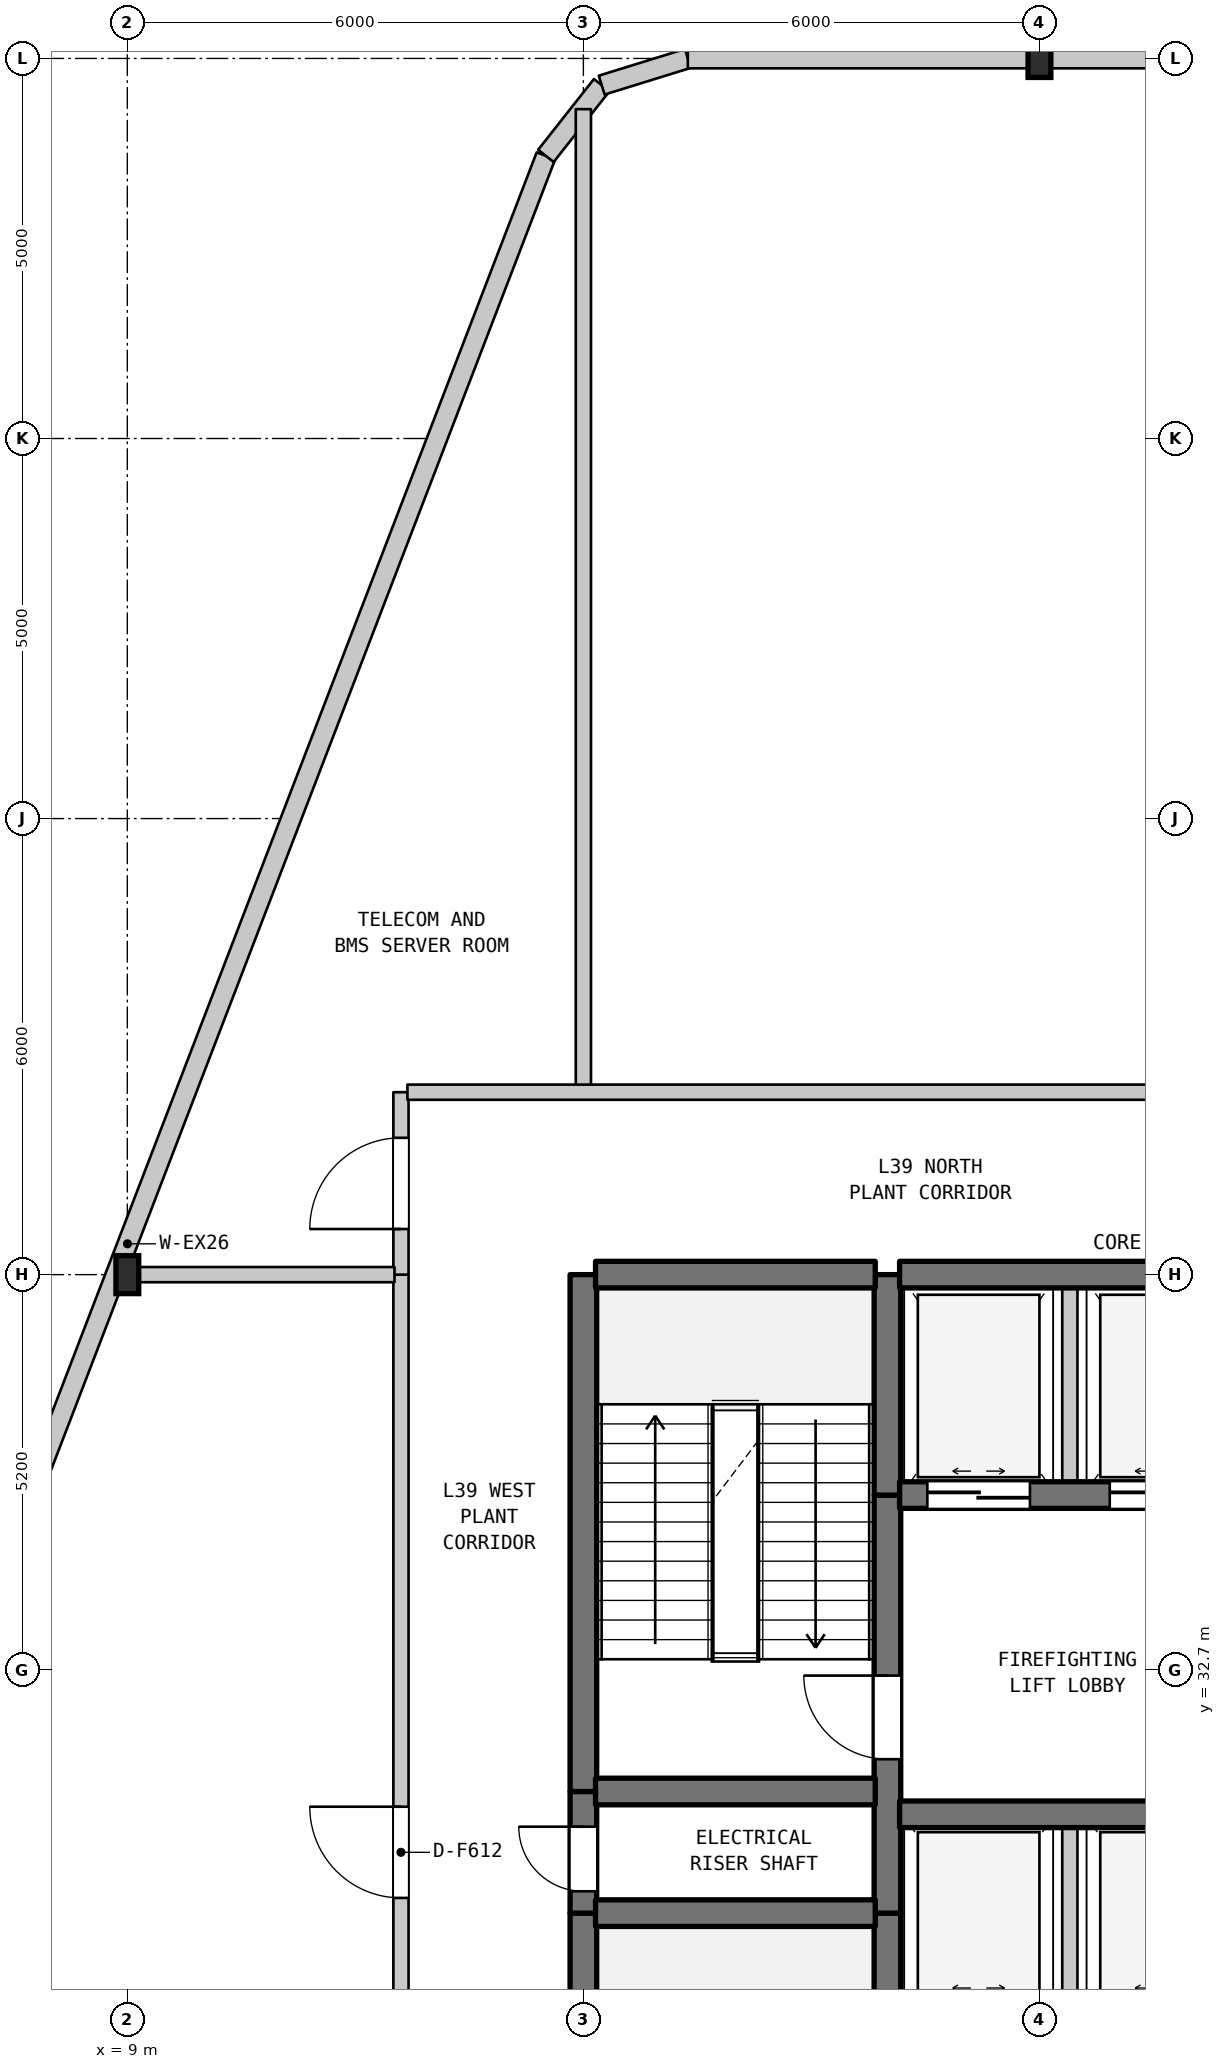
"""IFC4 building model, lengths in metres.
Left out: names, types, materials, properties, quantities, classifications, styles, units other than length and angle.
Written with IfcOpenShell. Run it as: python <this file> out.ifc"""

import sys

from ifc_helpers import new_model, si_unit, direction, frame, frame_2d, origin, origin_2d, place, context, subcontext, project, spatial, rectangle, i_section, extrude, element, fill, save


model = new_model("IFC4")
c1 = context("Model", 3, precision=1e-05, world=origin(), true_north=direction((0.0, 1.0)))
c2 = subcontext(c1, "Body", "Model", "MODEL_VIEW")
j1 = project(units=[si_unit("LENGTHUNIT", "METRE"), si_unit("PLANEANGLEUNIT", "RADIAN")], contexts=[c1])
p1 = place(None, origin())
s1 = spatial("IfcSite", under=j1, at=p1, CompositionType="ELEMENT")
p2 = place(p1, origin())
s2 = spatial("IfcBuilding", under=s1, at=p2, CompositionType="ELEMENT")
p3 = place(p2, frame((0.0, 0.0, 159.4)))
s3 = spatial("IfcBuildingStorey", under=s2, at=p3, CompositionType="ELEMENT", Elevation=159.4)
for number, where, z_axis, x_axis in (
    (1, (9.0, 37.9, 0.0), (0.0, 0.0, 1.0), (1.0, 0.0, 0.0)),
    (2, (21.0, 53.9, 0.0), (0.0, 0.0, 1.0), (1.0, 0.0, 0.0)),
):
    element("IfcColumn", number, at=place(p3, frame(where, z_axis=z_axis, x_axis=x_axis)), inside=s3, PredefinedType="COLUMN", context=c2, shape_type="SweptSolid", body=[
        extrude(i_section(OverallWidth=0.3, OverallDepth=0.5, WebThickness=0.014, FlangeThickness=0.028, FilletRadius=0.027, at=origin_2d()), origin(), (0.0, 0.0, 1.0), 5.2),
    ])
p4 = place(p3, frame((3.497, 23.993, 0.0), z_axis=(0.0, 0.0, 1.0), x_axis=(0.358990281293, 0.93334129767, 0.0)))
e3 = element("IfcWall", 3, at=p4, inside=s3, PredefinedType="STANDARD", context=c2, shape_type="SweptSolid", body=[
    extrude(rectangle(XDim=30.669, YDim=0.26, at=frame_2d((15.335, 0.0))), origin(), (0.0, 0.0, 1.0), 4.89),
])
p5 = place(p3, frame((14.507, 52.618, 0.0), z_axis=(0.0, 0.0, 1.0), x_axis=(0.619003121736, 0.78538852505, 0.0)))
e4 = element("IfcWall", 4, at=p5, inside=s3, PredefinedType="STANDARD", context=c2, shape_type="SweptSolid", body=[
    extrude(rectangle(XDim=1.186, YDim=0.26, at=frame_2d((0.593, 0.0))), origin(), (0.0, 0.0, 1.0), 4.89),
])
p6 = place(p3, frame((15.241, 53.549, 0.0), z_axis=(0.0, 0.0, 1.0), x_axis=(0.955256816454, 0.295777643879, 0.0)))
e5 = element("IfcWall", 5, at=p6, inside=s3, PredefinedType="STANDARD", context=c2, shape_type="SweptSolid", body=[
    extrude(rectangle(XDim=1.186, YDim=0.26, at=frame_2d((0.593, 0.0))), origin(), (0.0, 0.0, 1.0), 4.89),
])
p7 = place(p3, frame((16.374, 53.9, 0.0), z_axis=(0.0, 0.0, 1.0), x_axis=(1.0, 0.0, 0.0)))
e6 = element("IfcWall", 6, at=p7, inside=s3, PredefinedType="STANDARD", context=c2, shape_type="SweptSolid", body=[
    extrude(rectangle(XDim=4.626, YDim=0.26, at=frame_2d((2.313, 0.0))), origin(), (0.0, 0.0, 1.0), 4.89),
])
p8 = place(p3, frame((12.6, 22.7, 0.0), z_axis=(0.0, 0.0, 1.0), x_axis=(0.0, 1.0, 0.0)))
e7 = element("IfcWall", 7, at=p8, inside=s3, PredefinedType="STANDARD", context=c2, shape_type="SweptSolid", body=[
    extrude(rectangle(XDim=15.2, YDim=0.2, at=frame_2d((7.6, 0.0))), origin(), (0.0, 0.0, 1.0), 4.89),
])
p9 = place(p8, frame((7.0, 0.0, 0.0)))
e8 = element("IfcOpeningElement", 8, at=p9, cuts=e7, PredefinedType="OPENING", context=c2, shape_type="SweptSolid", body=[
    extrude(rectangle(XDim=1.2, YDim=2.2, at=frame_2d((0.6, 1.1))), frame((0.0, 0.11, 0.0), z_axis=(0.0, -1.0, 0.0), x_axis=(1.0, 0.0, 0.0)), (0.0, 0.0, 1.0), 0.22),
])
p10 = place(p3, frame((12.6, 37.9, 0.0), z_axis=(0.0, 0.0, 1.0), x_axis=(0.0, 1.0, 0.0)))
e9 = element("IfcWall", 9, at=p10, inside=s3, PredefinedType="STANDARD", context=c2, shape_type="SweptSolid", body=[
    extrude(rectangle(XDim=2.4, YDim=0.2, at=frame_2d((1.2, 0.0))), origin(), (0.0, 0.0, 1.0), 4.89),
])
p11 = place(p10, frame((0.6, 0.0, 0.0)))
e10 = element("IfcOpeningElement", 10, at=p11, cuts=e9, PredefinedType="OPENING", context=c2, shape_type="SweptSolid", body=[
    extrude(rectangle(XDim=1.2, YDim=2.2, at=frame_2d((0.6, 1.1))), frame((0.0, 0.11, 0.0), z_axis=(0.0, -1.0, 0.0), x_axis=(1.0, 0.0, 0.0)), (0.0, 0.0, 1.0), 0.22),
])
p12 = place(p3, frame((15.0, 22.7, 0.0), z_axis=(0.0, 0.0, 1.0), x_axis=(0.0, 1.0, 0.0)))
e11 = element("IfcWall", 11, at=p12, inside=s3, PredefinedType="SHEAR", context=c2, shape_type="SweptSolid", body=[
    extrude(rectangle(XDim=6.8, YDim=0.35, at=frame_2d((3.4, 0.0))), origin(), (0.0, 0.0, 1.0), 4.89),
])
p13 = place(p3, frame((15.0, 29.5, 0.0), z_axis=(0.0, 0.0, 1.0), x_axis=(0.0, 1.0, 0.0)))
e12 = element("IfcWall", 12, at=p13, inside=s3, PredefinedType="SHEAR", context=c2, shape_type="SweptSolid", body=[
    extrude(rectangle(XDim=1.6, YDim=0.35, at=frame_2d((0.8, 0.0))), origin(), (0.0, 0.0, 1.0), 4.89),
])
p14 = place(p13, frame((0.287, 0.0, 0.0)))
e13 = element("IfcOpeningElement", 13, at=p14, cuts=e12, PredefinedType="OPENING", context=c2, shape_type="SweptSolid", body=[
    extrude(rectangle(XDim=0.85, YDim=2.1, at=frame_2d((0.425, 1.05))), frame((0.0, 0.185, 0.0), z_axis=(0.0, -1.0, 0.0), x_axis=(1.0, 0.0, 0.0)), (0.0, 0.0, 1.0), 0.37),
])
p15 = place(p3, frame((15.0, 31.1, 0.0), z_axis=(0.0, 0.0, 1.0), x_axis=(0.0, 1.0, 0.0)))
e14 = element("IfcWall", 14, at=p15, inside=s3, PredefinedType="SHEAR", context=c2, shape_type="SweptSolid", body=[
    extrude(rectangle(XDim=6.8, YDim=0.35, at=frame_2d((3.4, 0.0))), origin(), (0.0, 0.0, 1.0), 4.89),
])
p16 = place(p3, frame((15.0, 40.3, 0.0), z_axis=(0.0, 0.0, 1.0), x_axis=(0.0, 1.0, 0.0)))
e15 = element("IfcWall", 15, at=p16, inside=s3, PredefinedType="STANDARD", context=c2, shape_type="SweptSolid", body=[
    extrude(rectangle(XDim=12.933, YDim=0.2, at=frame_2d((6.466, 0.0))), origin(), (0.0, 0.0, 1.0), 4.89),
])
p17 = place(p3, frame((19.0, 28.2, 0.0), z_axis=(0.0, 0.0, 1.0), x_axis=(0.0, 1.0, 0.0)))
e16 = element("IfcWall", 16, at=p17, inside=s3, PredefinedType="SHEAR", context=c2, shape_type="SweptSolid", body=[
    extrude(rectangle(XDim=1.3, YDim=0.35, at=frame_2d((0.65, 0.0))), origin(), (0.0, 0.0, 1.0), 4.89),
])
p18 = place(p3, frame((19.0, 29.5, 0.0), z_axis=(0.0, 0.0, 1.0), x_axis=(0.0, 1.0, 0.0)))
e17 = element("IfcWall", 17, at=p18, inside=s3, PredefinedType="SHEAR", context=c2, shape_type="SweptSolid", body=[
    extrude(rectangle(XDim=5.5, YDim=0.35, at=frame_2d((2.75, 0.0))), origin(), (0.0, 0.0, 1.0), 4.89),
])
p19 = place(p18, frame((2.025, 0.0, 0.0)))
e18 = element("IfcOpeningElement", 18, at=p19, cuts=e17, PredefinedType="OPENING", context=c2, shape_type="SweptSolid", body=[
    extrude(rectangle(XDim=1.1, YDim=2.15, at=frame_2d((0.55, 1.075))), frame((0.0, 0.185, 0.0), z_axis=(0.0, -1.0, 0.0), x_axis=(1.0, 0.0, 0.0)), (0.0, 0.0, 1.0), 0.37),
])
p20 = place(p3, frame((19.0, 35.0, 0.0), z_axis=(0.0, 0.0, 1.0), x_axis=(0.0, 1.0, 0.0)))
e19 = element("IfcWall", 19, at=p20, inside=s3, PredefinedType="SHEAR", context=c2, shape_type="SweptSolid", body=[
    extrude(rectangle(XDim=2.9, YDim=0.35, at=frame_2d((1.45, 0.0))), origin(), (0.0, 0.0, 1.0), 4.89),
])
p21 = place(p3, frame((21.4, 28.2, 0.0), z_axis=(0.0, 0.0, 1.0), x_axis=(0.0, 1.0, 0.0)))
e20 = element("IfcWall", 20, at=p21, inside=s3, PredefinedType="STANDARD", context=c2, shape_type="SweptSolid", body=[
    extrude(rectangle(XDim=2.6, YDim=0.2, at=frame_2d((1.3, 0.0))), origin(), (0.0, 0.0, 1.0), 4.89),
])
p22 = place(p3, frame((21.4, 35.0, 0.0), z_axis=(0.0, 0.0, 1.0), x_axis=(0.0, 1.0, 0.0)))
e21 = element("IfcWall", 21, at=p22, inside=s3, PredefinedType="STANDARD", context=c2, shape_type="SweptSolid", body=[
    extrude(rectangle(XDim=2.9, YDim=0.2, at=frame_2d((1.45, 0.0))), origin(), (0.0, 0.0, 1.0), 4.89),
])
p23 = place(p3, frame((15.16, 29.5, 0.0), z_axis=(0.0, 0.0, 1.0), x_axis=(1.0, 0.0, 0.0)))
e22 = element("IfcWall", 22, at=p23, inside=s3, PredefinedType="SHEAR", context=c2, shape_type="SweptSolid", body=[
    extrude(rectangle(XDim=3.68, YDim=0.35, at=frame_2d((1.84, 0.0))), origin(), (0.0, 0.0, 1.0), 4.89),
])
p24 = place(p3, frame((19.16, 30.8, 0.0), z_axis=(0.0, 0.0, 1.0), x_axis=(1.0, 0.0, 0.0)))
e23 = element("IfcWall", 23, at=p24, inside=s3, PredefinedType="SHEAR", context=c2, shape_type="SweptSolid", body=[
    extrude(rectangle(XDim=4.48, YDim=0.35, at=frame_2d((2.24, 0.0))), origin(), (0.0, 0.0, 1.0), 4.89),
])
p25 = place(p3, frame((15.16, 31.1, 0.0), z_axis=(0.0, 0.0, 1.0), x_axis=(1.0, 0.0, 0.0)))
e24 = element("IfcWall", 24, at=p25, inside=s3, PredefinedType="SHEAR", context=c2, shape_type="SweptSolid", body=[
    extrude(rectangle(XDim=3.68, YDim=0.35, at=frame_2d((1.84, 0.0))), origin(), (0.0, 0.0, 1.0), 4.89),
])
p26 = place(p3, frame((19.16, 35.0, 0.0), z_axis=(0.0, 0.0, 1.0), x_axis=(1.0, 0.0, 0.0)))
e25 = element("IfcWall", 25, at=p26, inside=s3, PredefinedType="SHEAR", context=c2, shape_type="SweptSolid", body=[
    extrude(rectangle(XDim=4.48, YDim=0.35, at=frame_2d((2.24, 0.0))), origin(), (0.0, 0.0, 1.0), 4.89),
])
p27 = place(p26, frame((0.365, 0.0, 0.0)))
e26 = element("IfcOpeningElement", 26, at=p27, cuts=e25, PredefinedType="OPENING", context=c2, shape_type="SweptSolid", body=[
    extrude(rectangle(XDim=1.35, YDim=2.2, at=frame_2d((0.675, 1.1))), frame((0.0, 0.185, 0.0), z_axis=(0.0, -1.0, 0.0), x_axis=(1.0, 0.0, 0.0)), (0.0, 0.0, 1.0), 0.37),
])
p28 = place(p26, frame((2.765, 0.0, 0.0)))
e27 = element("IfcOpeningElement", 27, at=p28, cuts=e25, PredefinedType="OPENING", context=c2, shape_type="SweptSolid", body=[
    extrude(rectangle(XDim=1.35, YDim=2.2, at=frame_2d((0.675, 1.1))), frame((0.0, 0.185, 0.0), z_axis=(0.0, -1.0, 0.0), x_axis=(1.0, 0.0, 0.0)), (0.0, 0.0, 1.0), 0.37),
])
p29 = place(p3, frame((8.856, 37.9, 0.0), z_axis=(0.0, 0.0, 1.0), x_axis=(1.0, 0.0, 0.0)))
e28 = element("IfcWall", 28, at=p29, inside=s3, PredefinedType="STANDARD", context=c2, shape_type="SweptSolid", body=[
    extrude(rectangle(XDim=3.659, YDim=0.2, at=frame_2d((1.83, 0.0))), origin(), (0.0, 0.0, 1.0), 4.59),
])
p30 = place(p3, frame((15.16, 37.9, 0.0), z_axis=(0.0, 0.0, 1.0), x_axis=(1.0, 0.0, 0.0)))
e29 = element("IfcWall", 29, at=p30, inside=s3, PredefinedType="SHEAR", context=c2, shape_type="SweptSolid", body=[
    extrude(rectangle(XDim=3.68, YDim=0.35, at=frame_2d((1.84, 0.0))), origin(), (0.0, 0.0, 1.0), 4.89),
])
p31 = place(p3, frame((19.16, 37.9, 0.0), z_axis=(0.0, 0.0, 1.0), x_axis=(1.0, 0.0, 0.0)))
e30 = element("IfcWall", 30, at=p31, inside=s3, PredefinedType="SHEAR", context=c2, shape_type="SweptSolid", body=[
    extrude(rectangle(XDim=4.48, YDim=0.35, at=frame_2d((2.24, 0.0))), origin(), (0.0, 0.0, 1.0), 4.89),
])
p32 = place(p3, frame((12.685, 40.3, 0.0), z_axis=(0.0, 0.0, 1.0), x_axis=(1.0, 0.0, 0.0)))
e31 = element("IfcWall", 31, at=p32, inside=s3, PredefinedType="STANDARD", context=c2, shape_type="SweptSolid", body=[
    extrude(rectangle(XDim=20.23, YDim=0.2, at=frame_2d((10.115, 0.0))), origin(), (0.0, 0.0, 1.0), 4.89),
])
p33 = place(p32, frame((12.14, 0.0, 0.0)))
e32 = element("IfcOpeningElement", 32, at=p33, cuts=e31, PredefinedType="OPENING", context=c2, shape_type="SweptSolid", body=[
    extrude(rectangle(XDim=1.2, YDim=2.2, at=frame_2d((0.6, 1.1))), frame((0.0, 0.11, 0.0), z_axis=(0.0, -1.0, 0.0), x_axis=(1.0, 0.0, 0.0)), (0.0, 0.0, 1.0), 0.22),
])
p34 = place(p3, frame((21.0, 53.9, 0.0), z_axis=(0.0, 0.0, 1.0), x_axis=(1.0, 0.0, 0.0)))
e33 = element("IfcWall", 33, at=p34, inside=s3, PredefinedType="STANDARD", context=c2, shape_type="SweptSolid", body=[
    extrude(rectangle(XDim=12.0, YDim=0.26, at=frame_2d((6.0, 0.0))), origin(), (0.0, 0.0, 1.0), 4.59),
])
p35 = place(p9, origin())
e34 = element("IfcDoor", 34, at=p35, inside=s3, OperationType="SINGLE_SWING_RIGHT", PredefinedType="DOOR", context=c2, shape_type="SweptSolid", body=[
    extrude(rectangle(XDim=1.2, YDim=2.2, at=frame_2d((0.6, 1.1))), frame((0.0, 0.025, 0.0), z_axis=(0.0, -1.0, 0.0), x_axis=(1.0, 0.0, 0.0)), (0.0, 0.0, 1.0), 0.05),
])
fill(e8, e34)
p36 = place(p11, origin())
e35 = element("IfcDoor", 35, at=p36, inside=s3, OperationType="SINGLE_SWING_LEFT", PredefinedType="DOOR", context=c2, shape_type="SweptSolid", body=[
    extrude(rectangle(XDim=1.2, YDim=2.2, at=frame_2d((0.6, 1.1))), frame((0.0, 0.025, 0.0), z_axis=(0.0, -1.0, 0.0), x_axis=(1.0, 0.0, 0.0)), (0.0, 0.0, 1.0), 0.05),
])
fill(e10, e35)
p37 = place(p14, origin())
e36 = element("IfcDoor", 36, at=p37, inside=s3, OperationType="SINGLE_SWING_RIGHT", PredefinedType="DOOR", context=c2, shape_type="SweptSolid", body=[
    extrude(rectangle(XDim=0.85, YDim=2.1, at=frame_2d((0.425, 1.05))), frame((0.0, 0.025, 0.0), z_axis=(0.0, -1.0, 0.0), x_axis=(1.0, 0.0, 0.0)), (0.0, 0.0, 1.0), 0.05),
])
fill(e13, e36)
p38 = place(p19, origin())
e37 = element("IfcDoor", 37, at=p38, inside=s3, OperationType="SINGLE_SWING_RIGHT", PredefinedType="DOOR", context=c2, shape_type="SweptSolid", body=[
    extrude(rectangle(XDim=1.1, YDim=2.15, at=frame_2d((0.55, 1.075))), frame((0.0, 0.025, 0.0), z_axis=(0.0, -1.0, 0.0), x_axis=(1.0, 0.0, 0.0)), (0.0, 0.0, 1.0), 0.05),
])
fill(e18, e37)
p39 = place(p27, origin())
e38 = element("IfcDoor", 38, at=p39, inside=s3, OperationType="DOUBLE_DOOR_SLIDING", PredefinedType="DOOR", context=c2, shape_type="SweptSolid", body=[
    extrude(rectangle(XDim=1.35, YDim=2.2, at=frame_2d((0.675, 1.1))), frame((0.0, 0.025, 0.0), z_axis=(0.0, -1.0, 0.0), x_axis=(1.0, 0.0, 0.0)), (0.0, 0.0, 1.0), 0.05),
])
fill(e26, e38)
p40 = place(p28, origin())
e39 = element("IfcDoor", 39, at=p40, inside=s3, OperationType="DOUBLE_DOOR_SLIDING", PredefinedType="DOOR", context=c2, shape_type="SweptSolid", body=[
    extrude(rectangle(XDim=1.35, YDim=2.2, at=frame_2d((0.675, 1.1))), frame((0.0, 0.025, 0.0), z_axis=(0.0, -1.0, 0.0), x_axis=(1.0, 0.0, 0.0)), (0.0, 0.0, 1.0), 0.05),
])
fill(e27, e39)
save(model, sys.argv[1])
